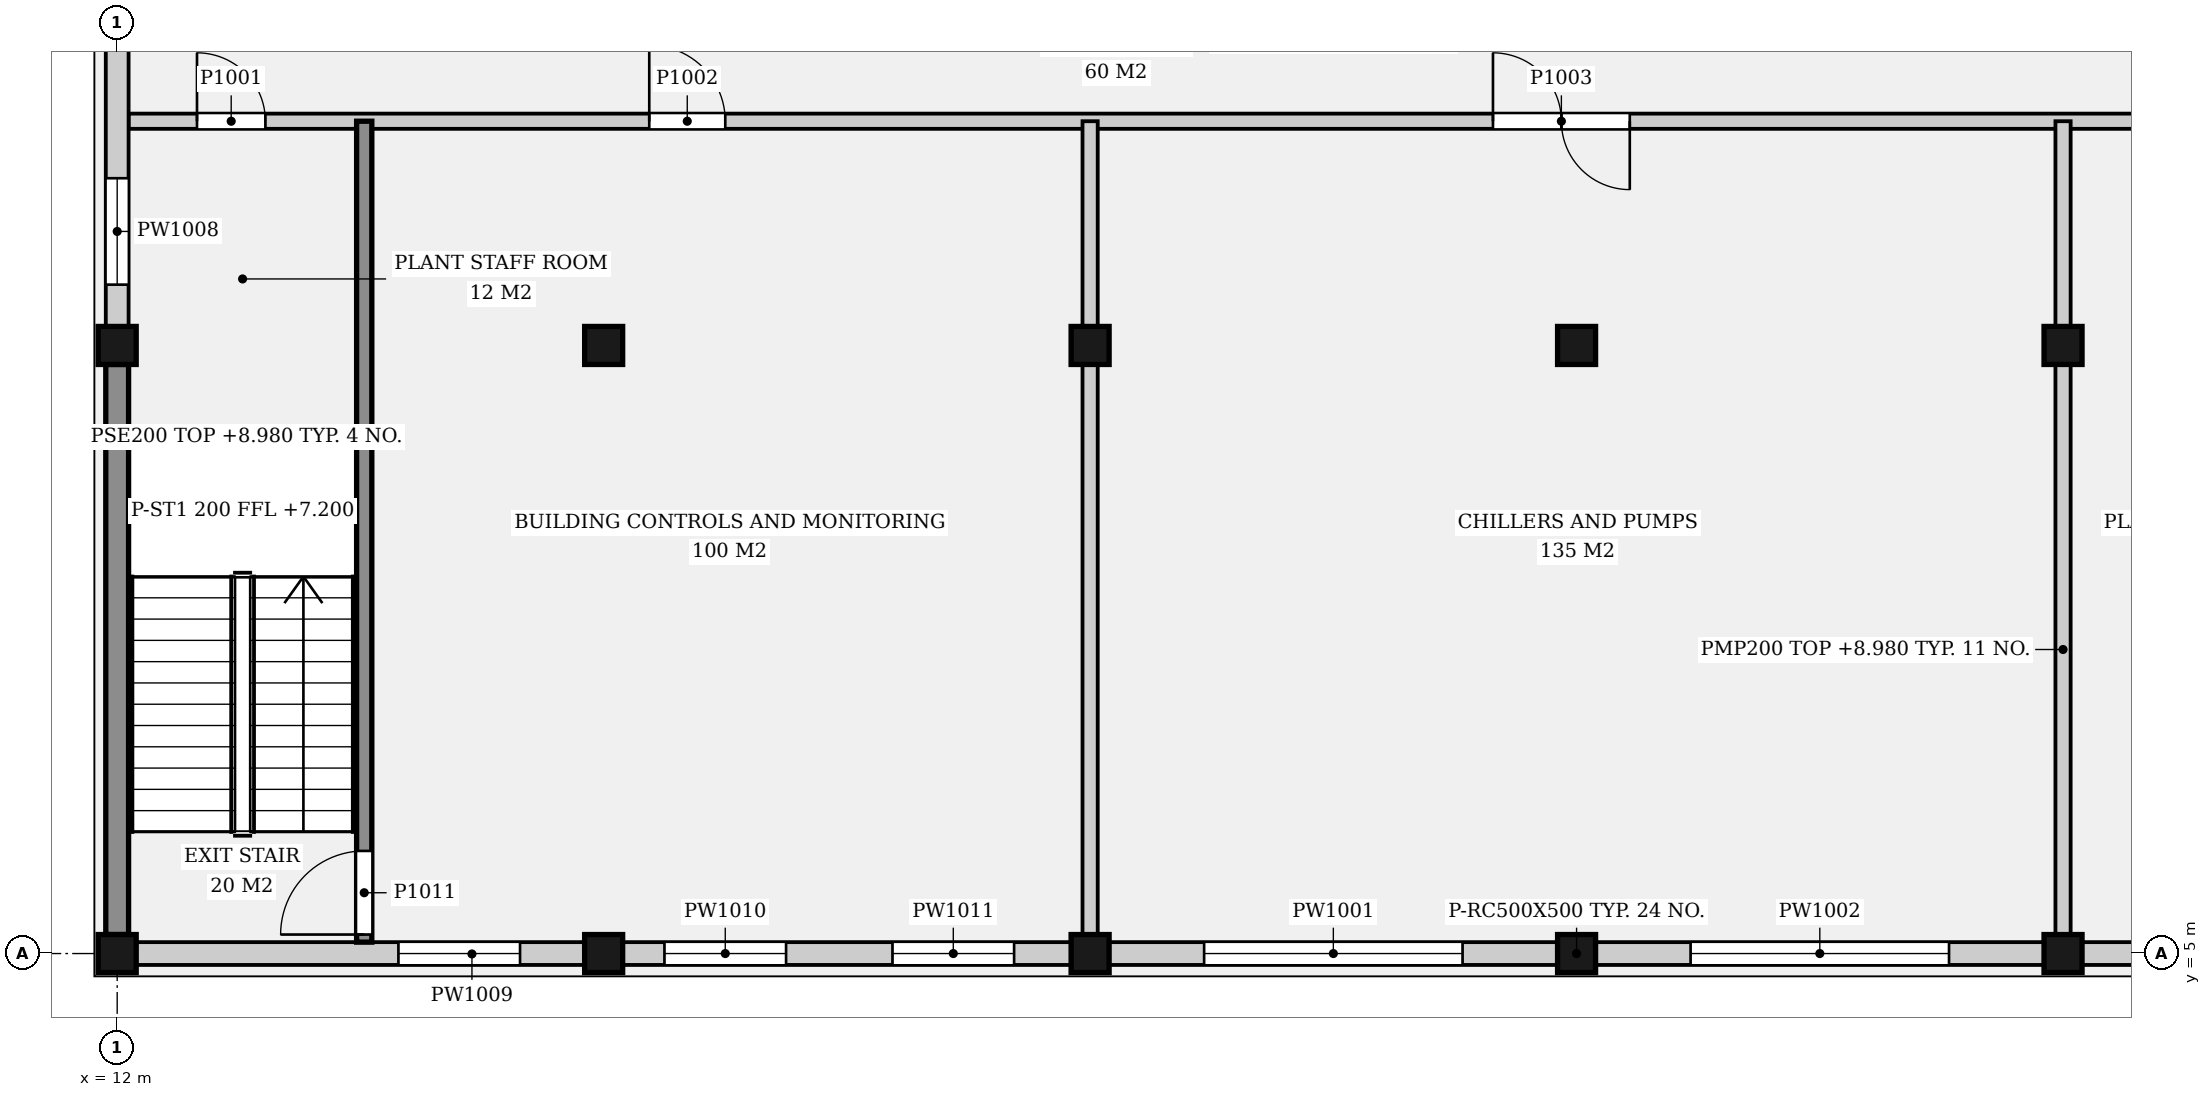
"""IFC4 building model, lengths in metres.
Left out: names, types, materials, properties, quantities, classifications, styles, units other than length and angle.
Written with IfcOpenShell. Run it as: python <this file> out.ifc"""

import sys

from ifc_helpers import new_model, si_unit, direction, frame, frame_2d, origin, origin_2d, place, context, subcontext, project, spatial, rectangle, extrude, element, fill, save


model = new_model("IFC4")
c1 = context("Model", 3, precision=1e-05, world=origin(), true_north=direction((0.0, 1.0)))
c2 = subcontext(c1, "Body", "Model", "MODEL_VIEW")
j1 = project(units=[si_unit("LENGTHUNIT", "METRE"), si_unit("PLANEANGLEUNIT", "RADIAN")], contexts=[c1])
p1 = place(None, origin())
s1 = spatial("IfcSite", under=j1, at=p1, CompositionType="ELEMENT")
p2 = place(p1, origin())
s2 = spatial("IfcBuilding", under=s1, at=p2, CompositionType="ELEMENT")
p3 = place(p2, frame((0.0, 0.0, 5.0)))
s3 = spatial("IfcBuildingStorey", under=s2, at=p3, CompositionType="ELEMENT", Elevation=5.0)
for number, where, z_axis, x_axis in (
    (1, (12.0, 5.0, 0.0), (0.0, 0.0, 1.0), (1.0, 0.0, 0.0)),
    (2, (12.0, 13.0, 0.0), (0.0, 0.0, 1.0), (1.0, 0.0, 0.0)),
    (3, (18.4, 5.0, 0.0), (0.0, 0.0, 1.0), (1.0, 0.0, 0.0)),
    (4, (18.4, 13.0, 0.0), (0.0, 0.0, 1.0), (1.0, 0.0, 0.0)),
    (5, (24.8, 5.0, 0.0), (0.0, 0.0, 1.0), (1.0, 0.0, 0.0)),
    (6, (24.8, 13.0, 0.0), (0.0, 0.0, 1.0), (1.0, 0.0, 0.0)),
    (7, (31.2, 5.0, 0.0), (0.0, 0.0, 1.0), (1.0, 0.0, 0.0)),
    (8, (31.2, 13.0, 0.0), (0.0, 0.0, 1.0), (1.0, 0.0, 0.0)),
    (9, (37.6, 5.0, 0.0), (0.0, 0.0, 1.0), (1.0, 0.0, 0.0)),
    (10, (37.6, 13.0, 0.0), (0.0, 0.0, 1.0), (1.0, 0.0, 0.0)),
):
    element("IfcColumn", number, at=place(p3, frame(where, z_axis=z_axis, x_axis=x_axis)), inside=s3, PredefinedType="COLUMN", context=c2, shape_type="SweptSolid", body=[
        extrude(rectangle(XDim=0.5, YDim=0.5, at=origin_2d()), origin(), (0.0, 0.0, 1.0), 4.4),
    ])
p4 = place(p3, frame((12.25, 5.0, 0.0), z_axis=(0.0, 0.0, 1.0), x_axis=(1.0, 0.0, 0.0)))
e11 = element("IfcWall", 11, at=p4, inside=s3, PredefinedType="SOLIDWALL", context=c2, shape_type="SweptSolid", body=[
    extrude(rectangle(XDim=5.9, YDim=0.3, at=frame_2d((2.95, 0.0))), origin(), (0.0, 0.0, 1.0), 3.98),
])
p5 = place(p4, frame((3.45, 0.0, 1.0)))
e12 = element("IfcOpeningElement", 12, at=p5, cuts=e11, PredefinedType="OPENING", context=c2, shape_type="SweptSolid", body=[
    extrude(rectangle(XDim=1.6, YDim=1.2, at=frame_2d((0.8, 0.6))), frame((0.0, 0.16, 0.0), z_axis=(0.0, -1.0, 0.0), x_axis=(1.0, 0.0, 0.0)), (0.0, 0.0, 1.0), 0.32),
])
p6 = place(p3, frame((18.65, 5.0, 0.0), z_axis=(0.0, 0.0, 1.0), x_axis=(1.0, 0.0, 0.0)))
e13 = element("IfcWall", 13, at=p6, inside=s3, PredefinedType="SOLIDWALL", context=c2, shape_type="SweptSolid", body=[
    extrude(rectangle(XDim=5.9, YDim=0.3, at=frame_2d((2.95, 0.0))), origin(), (0.0, 0.0, 1.0), 3.98),
])
p7 = place(p6, frame((0.55, 0.0, 1.0)))
e14 = element("IfcOpeningElement", 14, at=p7, cuts=e13, PredefinedType="OPENING", context=c2, shape_type="SweptSolid", body=[
    extrude(rectangle(XDim=1.6, YDim=1.2, at=frame_2d((0.8, 0.6))), frame((0.0, 0.16, 0.0), z_axis=(0.0, -1.0, 0.0), x_axis=(1.0, 0.0, 0.0)), (0.0, 0.0, 1.0), 0.32),
])
p8 = place(p6, frame((3.55, 0.0, 1.0)))
e15 = element("IfcOpeningElement", 15, at=p8, cuts=e13, PredefinedType="OPENING", context=c2, shape_type="SweptSolid", body=[
    extrude(rectangle(XDim=1.6, YDim=1.2, at=frame_2d((0.8, 0.6))), frame((0.0, 0.16, 0.0), z_axis=(0.0, -1.0, 0.0), x_axis=(1.0, 0.0, 0.0)), (0.0, 0.0, 1.0), 0.32),
])
p9 = place(p3, frame((25.05, 5.0, 0.0), z_axis=(0.0, 0.0, 1.0), x_axis=(1.0, 0.0, 0.0)))
e16 = element("IfcWall", 16, at=p9, inside=s3, PredefinedType="SOLIDWALL", context=c2, shape_type="SweptSolid", body=[
    extrude(rectangle(XDim=5.9, YDim=0.3, at=frame_2d((2.95, 0.0))), origin(), (0.0, 0.0, 1.0), 3.98),
])
p10 = place(p9, frame((1.25, 0.0, 0.6)))
e17 = element("IfcOpeningElement", 17, at=p10, cuts=e16, PredefinedType="OPENING", context=c2, shape_type="SweptSolid", body=[
    extrude(rectangle(XDim=3.4, YDim=2.4, at=frame_2d((1.7, 1.2))), frame((0.0, 0.16, 0.0), z_axis=(0.0, -1.0, 0.0), x_axis=(1.0, 0.0, 0.0)), (0.0, 0.0, 1.0), 0.32),
])
p11 = place(p3, frame((31.45, 5.0, 0.0), z_axis=(0.0, 0.0, 1.0), x_axis=(1.0, 0.0, 0.0)))
e18 = element("IfcWall", 18, at=p11, inside=s3, PredefinedType="SOLIDWALL", context=c2, shape_type="SweptSolid", body=[
    extrude(rectangle(XDim=5.9, YDim=0.3, at=frame_2d((2.95, 0.0))), origin(), (0.0, 0.0, 1.0), 3.98),
])
p12 = place(p11, frame((1.25, 0.0, 0.6)))
e19 = element("IfcOpeningElement", 19, at=p12, cuts=e18, PredefinedType="OPENING", context=c2, shape_type="SweptSolid", body=[
    extrude(rectangle(XDim=3.4, YDim=2.4, at=frame_2d((1.7, 1.2))), frame((0.0, 0.16, 0.0), z_axis=(0.0, -1.0, 0.0), x_axis=(1.0, 0.0, 0.0)), (0.0, 0.0, 1.0), 0.32),
])
p13 = place(p3, frame((37.85, 5.0, 0.0), z_axis=(0.0, 0.0, 1.0), x_axis=(1.0, 0.0, 0.0)))
e20 = element("IfcWall", 20, at=p13, inside=s3, PredefinedType="SOLIDWALL", context=c2, shape_type="SweptSolid", body=[
    extrude(rectangle(XDim=5.9, YDim=0.3, at=frame_2d((2.95, 0.0))), origin(), (0.0, 0.0, 1.0), 3.98),
])
p14 = place(p3, frame((12.0, 5.25, 0.0), z_axis=(0.0, 0.0, 1.0), x_axis=(0.0, 1.0, 0.0)))
e21 = element("IfcWall", 21, at=p14, inside=s3, PredefinedType="SOLIDWALL", context=c2, shape_type="SweptSolid", body=[
    extrude(rectangle(XDim=7.5, YDim=0.3, at=frame_2d((3.75, 0.0))), origin(), (0.0, 0.0, 1.0), 3.98),
])
p15 = place(p3, frame((12.0, 13.25, 0.0), z_axis=(0.0, 0.0, 1.0), x_axis=(0.0, 1.0, 0.0)))
e22 = element("IfcWall", 22, at=p15, inside=s3, PredefinedType="SOLIDWALL", context=c2, shape_type="SweptSolid", body=[
    extrude(rectangle(XDim=7.5, YDim=0.3, at=frame_2d((3.75, 0.0))), origin(), (0.0, 0.0, 1.0), 3.98),
])
p16 = place(p15, frame((0.55, 0.0, 1.2)))
e23 = element("IfcOpeningElement", 23, at=p16, cuts=e22, PredefinedType="OPENING", context=c2, shape_type="SweptSolid", body=[
    extrude(rectangle(XDim=1.4, YDim=1.2, at=frame_2d((0.7, 0.6))), frame((0.0, 0.16, 0.0), z_axis=(0.0, -1.0, 0.0), x_axis=(1.0, 0.0, 0.0)), (0.0, 0.0, 1.0), 0.32),
])
p17 = place(p3, frame((12.15, 15.95, 0.0), z_axis=(0.0, 0.0, 1.0), x_axis=(1.0, 0.0, 0.0)))
e24 = element("IfcWall", 24, at=p17, inside=s3, PredefinedType="PARTITIONING", context=c2, shape_type="SweptSolid", body=[
    extrude(rectangle(XDim=31.7, YDim=0.2, at=frame_2d((15.85, 0.0))), origin(), (0.0, 0.0, 1.0), 3.98),
])
p18 = place(p17, frame((0.9, 0.0, 0.0)))
e25 = element("IfcOpeningElement", 25, at=p18, cuts=e24, PredefinedType="OPENING", context=c2, shape_type="SweptSolid", body=[
    extrude(rectangle(XDim=0.9, YDim=2.1, at=frame_2d((0.45, 1.05))), frame((0.0, 0.11, 0.0), z_axis=(0.0, -1.0, 0.0), x_axis=(1.0, 0.0, 0.0)), (0.0, 0.0, 1.0), 0.22),
])
p19 = place(p17, frame((6.85, 0.0, 0.0)))
e26 = element("IfcOpeningElement", 26, at=p19, cuts=e24, PredefinedType="OPENING", context=c2, shape_type="SweptSolid", body=[
    extrude(rectangle(XDim=1.0, YDim=2.1, at=frame_2d((0.5, 1.05))), frame((0.0, 0.11, 0.0), z_axis=(0.0, -1.0, 0.0), x_axis=(1.0, 0.0, 0.0)), (0.0, 0.0, 1.0), 0.22),
])
p20 = place(p17, frame((17.95, 0.0, 0.0)))
e27 = element("IfcOpeningElement", 27, at=p20, cuts=e24, PredefinedType="OPENING", context=c2, shape_type="SweptSolid", body=[
    extrude(rectangle(XDim=1.8, YDim=2.4, at=frame_2d((0.9, 1.2))), frame((0.0, 0.11, 0.0), z_axis=(0.0, -1.0, 0.0), x_axis=(1.0, 0.0, 0.0)), (0.0, 0.0, 1.0), 0.22),
])
p21 = place(p17, frame((26.65, 0.0, 0.0)))
e28 = element("IfcOpeningElement", 28, at=p21, cuts=e24, PredefinedType="OPENING", context=c2, shape_type="SweptSolid", body=[
    extrude(rectangle(XDim=1.0, YDim=2.1, at=frame_2d((0.5, 1.05))), frame((0.0, 0.11, 0.0), z_axis=(0.0, -1.0, 0.0), x_axis=(1.0, 0.0, 0.0)), (0.0, 0.0, 1.0), 0.22),
])
p22 = place(p17, frame((29.7, 0.0, 0.0)))
e29 = element("IfcOpeningElement", 29, at=p22, cuts=e24, PredefinedType="OPENING", context=c2, shape_type="SweptSolid", body=[
    extrude(rectangle(XDim=1.1, YDim=2.1, at=frame_2d((0.55, 1.05))), frame((0.0, 0.11, 0.0), z_axis=(0.0, -1.0, 0.0), x_axis=(1.0, 0.0, 0.0)), (0.0, 0.0, 1.0), 0.22),
])
p23 = place(p3, frame((15.25, 5.15, 0.0), z_axis=(0.0, 0.0, 1.0), x_axis=(0.0, 1.0, 0.0)))
e30 = element("IfcWall", 30, at=p23, inside=s3, PredefinedType="SOLIDWALL", context=c2, shape_type="SweptSolid", body=[
    extrude(rectangle(XDim=10.8, YDim=0.2, at=frame_2d((5.4, 0.0))), origin(), (0.0, 0.0, 1.0), 3.98),
])
p24 = place(p23, frame((0.1, 0.0, 0.0)))
e31 = element("IfcOpeningElement", 31, at=p24, cuts=e30, PredefinedType="OPENING", context=c2, shape_type="SweptSolid", body=[
    extrude(rectangle(XDim=1.1, YDim=2.1, at=frame_2d((0.55, 1.05))), frame((0.0, 0.11, 0.0), z_axis=(0.0, -1.0, 0.0), x_axis=(1.0, 0.0, 0.0)), (0.0, 0.0, 1.0), 0.22),
])
p25 = place(p3, frame((24.8, 5.25, 0.0), z_axis=(0.0, 0.0, 1.0), x_axis=(0.0, 1.0, 0.0)))
e32 = element("IfcWall", 32, at=p25, inside=s3, PredefinedType="PARTITIONING", context=c2, shape_type="SweptSolid", body=[
    extrude(rectangle(XDim=7.5, YDim=0.2, at=frame_2d((3.75, 0.0))), origin(), (0.0, 0.0, 1.0), 3.98),
])
p26 = place(p3, frame((24.8, 13.25, 0.0), z_axis=(0.0, 0.0, 1.0), x_axis=(0.0, 1.0, 0.0)))
e33 = element("IfcWall", 33, at=p26, inside=s3, PredefinedType="PARTITIONING", context=c2, shape_type="SweptSolid", body=[
    extrude(rectangle(XDim=2.7, YDim=0.2, at=frame_2d((1.35, 0.0))), origin(), (0.0, 0.0, 1.0), 3.98),
])
p27 = place(p3, frame((37.6, 5.25, 0.0), z_axis=(0.0, 0.0, 1.0), x_axis=(0.0, 1.0, 0.0)))
e34 = element("IfcWall", 34, at=p27, inside=s3, PredefinedType="PARTITIONING", context=c2, shape_type="SweptSolid", body=[
    extrude(rectangle(XDim=7.5, YDim=0.2, at=frame_2d((3.75, 0.0))), origin(), (0.0, 0.0, 1.0), 3.98),
])
p28 = place(p3, frame((37.6, 13.25, 0.0), z_axis=(0.0, 0.0, 1.0), x_axis=(0.0, 1.0, 0.0)))
e35 = element("IfcWall", 35, at=p28, inside=s3, PredefinedType="PARTITIONING", context=c2, shape_type="SweptSolid", body=[
    extrude(rectangle(XDim=2.7, YDim=0.2, at=frame_2d((1.35, 0.0))), origin(), (0.0, 0.0, 1.0), 3.98),
])
p29 = place(p3, frame((12.15, 11.8, 0.0), z_axis=(0.0, 0.0, 1.0), x_axis=(1.0, 0.0, 0.0)))
e36 = element("IfcWall", 36, at=p29, inside=s3, PredefinedType="SOLIDWALL", context=c2, shape_type="SweptSolid", body=[
    extrude(rectangle(XDim=3.1, YDim=0.2, at=frame_2d((1.55, 0.0))), origin(), (0.0, 0.0, 1.0), 3.98),
])
p30 = place(p10, origin())
e37 = element("IfcWindow", 37, at=p30, inside=s3, PartitioningType="SINGLE_PANEL", PredefinedType="USERDEFINED", context=c2, shape_type="SweptSolid", body=[
    extrude(rectangle(XDim=3.4, YDim=2.4, at=frame_2d((1.7, 1.2))), frame((0.0, 0.03, 0.0), z_axis=(0.0, -1.0, 0.0), x_axis=(1.0, 0.0, 0.0)), (0.0, 0.0, 1.0), 0.06),
])
fill(e17, e37)
p31 = place(p12, origin())
e38 = element("IfcWindow", 38, at=p31, inside=s3, PartitioningType="SINGLE_PANEL", PredefinedType="USERDEFINED", context=c2, shape_type="SweptSolid", body=[
    extrude(rectangle(XDim=3.4, YDim=2.4, at=frame_2d((1.7, 1.2))), frame((0.0, 0.03, 0.0), z_axis=(0.0, -1.0, 0.0), x_axis=(1.0, 0.0, 0.0)), (0.0, 0.0, 1.0), 0.06),
])
fill(e19, e38)
p32 = place(p16, origin())
e39 = element("IfcWindow", 39, at=p32, inside=s3, PartitioningType="SINGLE_PANEL", PredefinedType="USERDEFINED", context=c2, shape_type="SweptSolid", body=[
    extrude(rectangle(XDim=1.4, YDim=1.2, at=frame_2d((0.7, 0.6))), frame((0.0, 0.03, 0.0), z_axis=(0.0, -1.0, 0.0), x_axis=(1.0, 0.0, 0.0)), (0.0, 0.0, 1.0), 0.06),
])
fill(e23, e39)
p33 = place(p5, origin())
e40 = element("IfcWindow", 40, at=p33, inside=s3, PartitioningType="SINGLE_PANEL", PredefinedType="WINDOW", context=c2, shape_type="SweptSolid", body=[
    extrude(rectangle(XDim=1.6, YDim=1.2, at=frame_2d((0.8, 0.6))), frame((0.0, 0.03, 0.0), z_axis=(0.0, -1.0, 0.0), x_axis=(1.0, 0.0, 0.0)), (0.0, 0.0, 1.0), 0.06),
])
fill(e12, e40)
p34 = place(p7, origin())
e41 = element("IfcWindow", 41, at=p34, inside=s3, PartitioningType="SINGLE_PANEL", PredefinedType="WINDOW", context=c2, shape_type="SweptSolid", body=[
    extrude(rectangle(XDim=1.6, YDim=1.2, at=frame_2d((0.8, 0.6))), frame((0.0, 0.03, 0.0), z_axis=(0.0, -1.0, 0.0), x_axis=(1.0, 0.0, 0.0)), (0.0, 0.0, 1.0), 0.06),
])
fill(e14, e41)
p35 = place(p8, origin())
e42 = element("IfcWindow", 42, at=p35, inside=s3, PartitioningType="SINGLE_PANEL", PredefinedType="WINDOW", context=c2, shape_type="SweptSolid", body=[
    extrude(rectangle(XDim=1.6, YDim=1.2, at=frame_2d((0.8, 0.6))), frame((0.0, 0.03, 0.0), z_axis=(0.0, -1.0, 0.0), x_axis=(1.0, 0.0, 0.0)), (0.0, 0.0, 1.0), 0.06),
])
fill(e15, e42)
p36 = place(p18, origin())
e43 = element("IfcDoor", 43, at=p36, inside=s3, OperationType="SINGLE_SWING_LEFT", PredefinedType="DOOR", context=c2, shape_type="SweptSolid", body=[
    extrude(rectangle(XDim=0.9, YDim=2.1, at=frame_2d((0.45, 1.05))), frame((0.0, 0.025, 0.0), z_axis=(0.0, -1.0, 0.0), x_axis=(1.0, 0.0, 0.0)), (0.0, 0.0, 1.0), 0.05),
])
fill(e25, e43)
p37 = place(p19, origin())
e44 = element("IfcDoor", 44, at=p37, inside=s3, OperationType="SINGLE_SWING_LEFT", PredefinedType="DOOR", context=c2, shape_type="SweptSolid", body=[
    extrude(rectangle(XDim=1.0, YDim=2.1, at=frame_2d((0.5, 1.05))), frame((0.0, 0.025, 0.0), z_axis=(0.0, -1.0, 0.0), x_axis=(1.0, 0.0, 0.0)), (0.0, 0.0, 1.0), 0.05),
])
fill(e26, e44)
p38 = place(p20, origin())
e45 = element("IfcDoor", 45, at=p38, inside=s3, OperationType="DOUBLE_DOOR_SINGLE_SWING", PredefinedType="DOOR", context=c2, shape_type="SweptSolid", body=[
    extrude(rectangle(XDim=1.8, YDim=2.4, at=frame_2d((0.9, 1.2))), frame((0.0, 0.025, 0.0), z_axis=(0.0, -1.0, 0.0), x_axis=(1.0, 0.0, 0.0)), (0.0, 0.0, 1.0), 0.05),
])
fill(e27, e45)
p39 = place(p24, origin())
e46 = element("IfcDoor", 46, at=p39, inside=s3, OperationType="SINGLE_SWING_LEFT", PredefinedType="DOOR", context=c2, shape_type="SweptSolid", body=[
    extrude(rectangle(XDim=1.1, YDim=2.1, at=frame_2d((0.55, 1.05))), frame((0.0, 0.025, 0.0), z_axis=(0.0, -1.0, 0.0), x_axis=(1.0, 0.0, 0.0)), (0.0, 0.0, 1.0), 0.05),
])
fill(e31, e46)
save(model, sys.argv[1])
